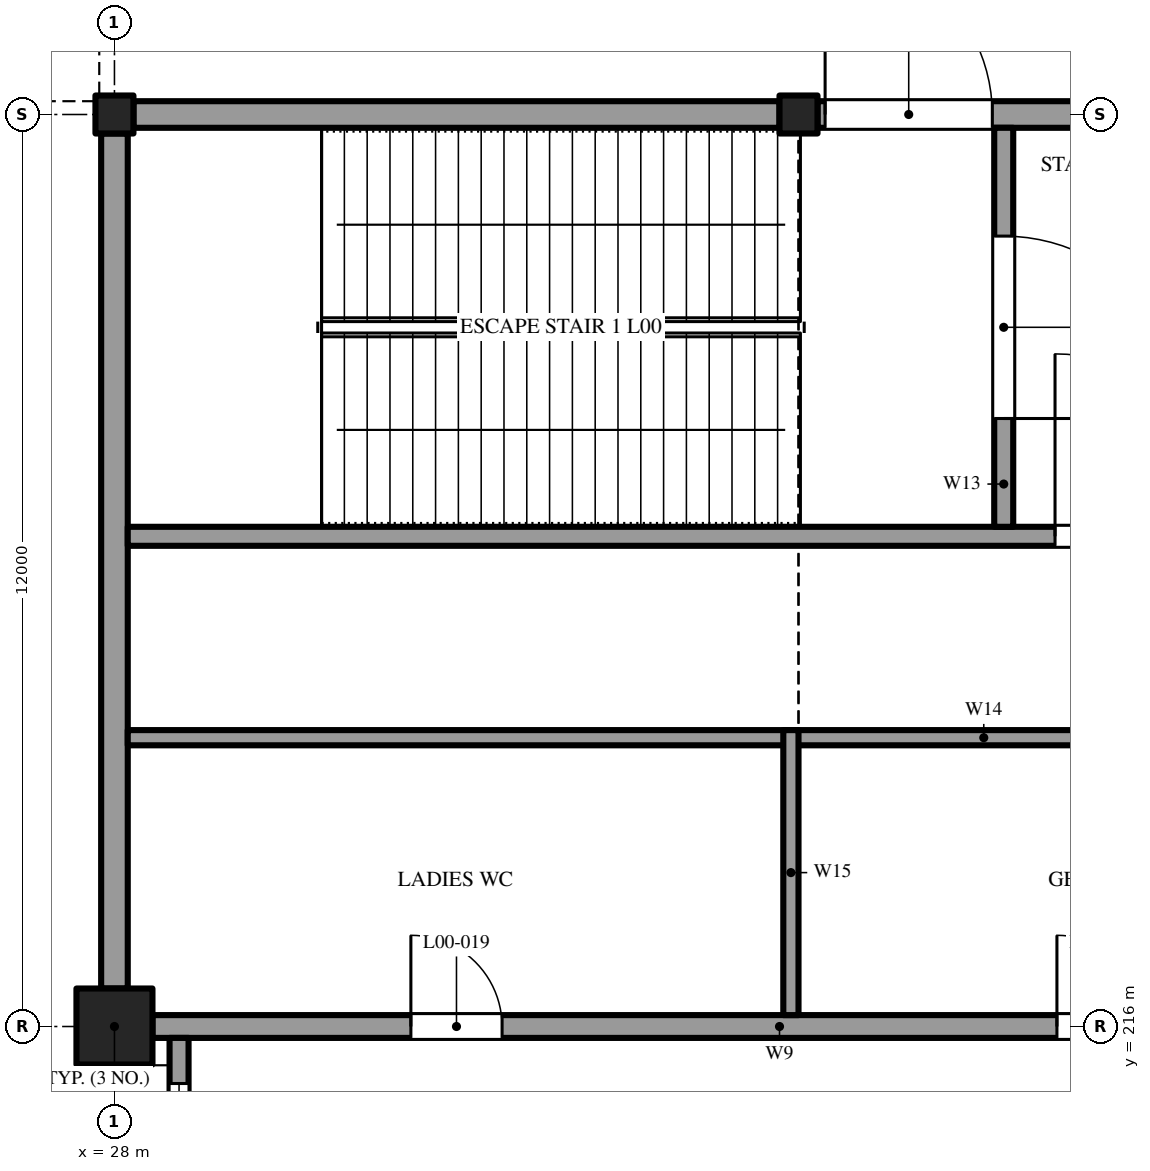
"""IFC4 building model, lengths in metres.
Left out: names, types, materials, properties, quantities, classifications, styles, units other than length and angle.
Written with IfcOpenShell. Run it as: python <this file> out.ifc"""

import sys

from ifc_helpers import new_model, si_unit, direction, frame, frame_2d, origin, origin_2d, place, context, subcontext, project, spatial, rectangle, extrude, element, fill, save


model = new_model("IFC4")
c1 = context("Model", 3, precision=1e-05, world=origin(), true_north=direction((0.0, 1.0)))
c2 = subcontext(c1, "Body", "Model", "MODEL_VIEW")
j1 = project(units=[si_unit("LENGTHUNIT", "METRE"), si_unit("PLANEANGLEUNIT", "RADIAN")], contexts=[c1])
p1 = place(None, origin())
s1 = spatial("IfcSite", under=j1, at=p1, CompositionType="ELEMENT")
p2 = place(p1, origin())
s2 = spatial("IfcBuilding", under=s1, at=p2, CompositionType="ELEMENT")
p3 = place(p2, origin())
s3 = spatial("IfcBuildingStorey", under=s2, at=p3, CompositionType="ELEMENT", Elevation=0.0)
p4 = place(p3, frame((28.0, 216.0, -0.4), z_axis=(0.0, 0.0, 1.0), x_axis=(1.0, 0.0, 0.0)))
e1 = element("IfcColumn", 1, at=p4, inside=s3, PredefinedType="COLUMN", context=c2, shape_type="SweptSolid", body=[
    extrude(rectangle(XDim=1.0, YDim=1.0, at=origin_2d()), origin(), (0.0, 0.0, 1.0), 7.6),
])
for number, where, z_axis, x_axis in (
    (2, (28.0, 228.0, -0.4), (0.0, 0.0, 1.0), (1.0, 0.0, 0.0)),
    (3, (37.0, 228.0, -0.4), (0.0, 0.0, 1.0), (1.0, 0.0, 0.0)),
):
    element("IfcColumn", number, at=place(p3, frame(where, z_axis=z_axis, x_axis=x_axis)), inside=s3, PredefinedType="COLUMN", context=c2, shape_type="SweptSolid", body=[
        extrude(rectangle(XDim=0.5, YDim=0.5, at=origin_2d()), origin(), (0.0, 0.0, 1.0), 7.6),
    ])
p5 = place(p3, frame((28.5, 216.0, 0.0), z_axis=(0.0, 0.0, 1.0), x_axis=(1.0, 0.0, 0.0)))
e4 = element("IfcWall", 4, at=p5, inside=s3, PredefinedType="SOLIDWALL", context=c2, shape_type="SweptSolid", body=[
    extrude(rectangle(XDim=17.0, YDim=0.3, at=frame_2d((8.5, 0.0))), origin(), (0.0, 0.0, 1.0), 6.8),
])
p6 = place(p5, frame((3.4, 0.0, 0.0)))
e5 = element("IfcOpeningElement", 5, at=p6, cuts=e4, PredefinedType="OPENING", context=c2, shape_type="SweptSolid", body=[
    extrude(rectangle(XDim=1.2, YDim=2.2, at=frame_2d((0.6, 1.1))), frame((0.0, 0.16, 0.0), z_axis=(0.0, -1.0, 0.0), x_axis=(1.0, 0.0, 0.0)), (0.0, 0.0, 1.0), 0.32),
])
p7 = place(p5, frame((11.9, 0.0, 0.0)))
e6 = element("IfcOpeningElement", 6, at=p7, cuts=e4, PredefinedType="OPENING", context=c2, shape_type="SweptSolid", body=[
    extrude(rectangle(XDim=1.2, YDim=2.2, at=frame_2d((0.6, 1.1))), frame((0.0, 0.16, 0.0), z_axis=(0.0, -1.0, 0.0), x_axis=(1.0, 0.0, 0.0)), (0.0, 0.0, 1.0), 0.32),
])
p8 = place(p3, frame((28.85, 132.15, 0.0), z_axis=(0.0, 0.0, 1.0), x_axis=(0.0, 1.0, 0.0)))
e7 = element("IfcWall", 7, at=p8, inside=s3, PredefinedType="SOLIDWALL", context=c2, shape_type="SweptSolid", body=[
    extrude(rectangle(XDim=83.7, YDim=0.25, at=frame_2d((41.85, 0.0))), origin(), (0.0, 0.0, 1.0), 7.2),
])
p9 = place(p8, frame((1.65, 0.0, 0.0)))
e8 = element("IfcOpeningElement", 8, at=p9, cuts=e7, PredefinedType="OPENING", context=c2, shape_type="SweptSolid", body=[
    extrude(rectangle(XDim=2.4, YDim=2.4, at=frame_2d((1.2, 1.2))), frame((0.0, 0.135, 0.0), z_axis=(0.0, -1.0, 0.0), x_axis=(1.0, 0.0, 0.0)), (0.0, 0.0, 1.0), 0.27),
])
p10 = place(p8, frame((0.6, 0.0, 3.2)))
e9 = element("IfcOpeningElement", 9, at=p10, cuts=e7, PredefinedType="OPENING", context=c2, shape_type="SweptSolid", body=[
    extrude(rectangle(XDim=4.5, YDim=3.0, at=frame_2d((2.25, 1.5))), frame((0.0, 0.135, 0.0), z_axis=(0.0, -1.0, 0.0), x_axis=(1.0, 0.0, 0.0)), (0.0, 0.0, 1.0), 0.27),
])
p11 = place(p8, frame((6.6, 0.0, 0.9)))
e10 = element("IfcOpeningElement", 10, at=p11, cuts=e7, PredefinedType="OPENING", context=c2, shape_type="SweptSolid", body=[
    extrude(rectangle(XDim=4.5, YDim=5.0, at=frame_2d((2.25, 2.5))), frame((0.0, 0.135, 0.0), z_axis=(0.0, -1.0, 0.0), x_axis=(1.0, 0.0, 0.0)), (0.0, 0.0, 1.0), 0.27),
])
p12 = place(p8, frame((13.65, 0.0, 0.0)))
e11 = element("IfcOpeningElement", 11, at=p12, cuts=e7, PredefinedType="OPENING", context=c2, shape_type="SweptSolid", body=[
    extrude(rectangle(XDim=2.4, YDim=2.4, at=frame_2d((1.2, 1.2))), frame((0.0, 0.135, 0.0), z_axis=(0.0, -1.0, 0.0), x_axis=(1.0, 0.0, 0.0)), (0.0, 0.0, 1.0), 0.27),
])
p13 = place(p8, frame((12.6, 0.0, 3.2)))
e12 = element("IfcOpeningElement", 12, at=p13, cuts=e7, PredefinedType="OPENING", context=c2, shape_type="SweptSolid", body=[
    extrude(rectangle(XDim=4.5, YDim=3.0, at=frame_2d((2.25, 1.5))), frame((0.0, 0.135, 0.0), z_axis=(0.0, -1.0, 0.0), x_axis=(1.0, 0.0, 0.0)), (0.0, 0.0, 1.0), 0.27),
])
p14 = place(p8, frame((18.6, 0.0, 0.9)))
e13 = element("IfcOpeningElement", 13, at=p14, cuts=e7, PredefinedType="OPENING", context=c2, shape_type="SweptSolid", body=[
    extrude(rectangle(XDim=4.5, YDim=5.0, at=frame_2d((2.25, 2.5))), frame((0.0, 0.135, 0.0), z_axis=(0.0, -1.0, 0.0), x_axis=(1.0, 0.0, 0.0)), (0.0, 0.0, 1.0), 0.27),
])
p15 = place(p8, frame((25.65, 0.0, 0.0)))
e14 = element("IfcOpeningElement", 14, at=p15, cuts=e7, PredefinedType="OPENING", context=c2, shape_type="SweptSolid", body=[
    extrude(rectangle(XDim=2.4, YDim=2.4, at=frame_2d((1.2, 1.2))), frame((0.0, 0.135, 0.0), z_axis=(0.0, -1.0, 0.0), x_axis=(1.0, 0.0, 0.0)), (0.0, 0.0, 1.0), 0.27),
])
p16 = place(p8, frame((24.6, 0.0, 3.2)))
e15 = element("IfcOpeningElement", 15, at=p16, cuts=e7, PredefinedType="OPENING", context=c2, shape_type="SweptSolid", body=[
    extrude(rectangle(XDim=4.5, YDim=3.0, at=frame_2d((2.25, 1.5))), frame((0.0, 0.135, 0.0), z_axis=(0.0, -1.0, 0.0), x_axis=(1.0, 0.0, 0.0)), (0.0, 0.0, 1.0), 0.27),
])
p17 = place(p8, frame((30.6, 0.0, 0.9)))
e16 = element("IfcOpeningElement", 16, at=p17, cuts=e7, PredefinedType="OPENING", context=c2, shape_type="SweptSolid", body=[
    extrude(rectangle(XDim=4.5, YDim=5.0, at=frame_2d((2.25, 2.5))), frame((0.0, 0.135, 0.0), z_axis=(0.0, -1.0, 0.0), x_axis=(1.0, 0.0, 0.0)), (0.0, 0.0, 1.0), 0.27),
])
p18 = place(p8, frame((37.65, 0.0, 0.0)))
e17 = element("IfcOpeningElement", 17, at=p18, cuts=e7, PredefinedType="OPENING", context=c2, shape_type="SweptSolid", body=[
    extrude(rectangle(XDim=2.4, YDim=2.4, at=frame_2d((1.2, 1.2))), frame((0.0, 0.135, 0.0), z_axis=(0.0, -1.0, 0.0), x_axis=(1.0, 0.0, 0.0)), (0.0, 0.0, 1.0), 0.27),
])
p19 = place(p8, frame((36.6, 0.0, 3.2)))
e18 = element("IfcOpeningElement", 18, at=p19, cuts=e7, PredefinedType="OPENING", context=c2, shape_type="SweptSolid", body=[
    extrude(rectangle(XDim=4.5, YDim=3.0, at=frame_2d((2.25, 1.5))), frame((0.0, 0.135, 0.0), z_axis=(0.0, -1.0, 0.0), x_axis=(1.0, 0.0, 0.0)), (0.0, 0.0, 1.0), 0.27),
])
p20 = place(p8, frame((43.65, 0.0, 0.0)))
e19 = element("IfcOpeningElement", 19, at=p20, cuts=e7, PredefinedType="OPENING", context=c2, shape_type="SweptSolid", body=[
    extrude(rectangle(XDim=2.4, YDim=2.4, at=frame_2d((1.2, 1.2))), frame((0.0, 0.135, 0.0), z_axis=(0.0, -1.0, 0.0), x_axis=(1.0, 0.0, 0.0)), (0.0, 0.0, 1.0), 0.27),
])
p21 = place(p8, frame((42.6, 0.0, 3.2)))
e20 = element("IfcOpeningElement", 20, at=p21, cuts=e7, PredefinedType="OPENING", context=c2, shape_type="SweptSolid", body=[
    extrude(rectangle(XDim=4.5, YDim=3.0, at=frame_2d((2.25, 1.5))), frame((0.0, 0.135, 0.0), z_axis=(0.0, -1.0, 0.0), x_axis=(1.0, 0.0, 0.0)), (0.0, 0.0, 1.0), 0.27),
])
p22 = place(p8, frame((48.6, 0.0, 0.9)))
e21 = element("IfcOpeningElement", 21, at=p22, cuts=e7, PredefinedType="OPENING", context=c2, shape_type="SweptSolid", body=[
    extrude(rectangle(XDim=4.5, YDim=5.0, at=frame_2d((2.25, 2.5))), frame((0.0, 0.135, 0.0), z_axis=(0.0, -1.0, 0.0), x_axis=(1.0, 0.0, 0.0)), (0.0, 0.0, 1.0), 0.27),
])
p23 = place(p8, frame((55.65, 0.0, 0.0)))
e22 = element("IfcOpeningElement", 22, at=p23, cuts=e7, PredefinedType="OPENING", context=c2, shape_type="SweptSolid", body=[
    extrude(rectangle(XDim=2.4, YDim=2.4, at=frame_2d((1.2, 1.2))), frame((0.0, 0.135, 0.0), z_axis=(0.0, -1.0, 0.0), x_axis=(1.0, 0.0, 0.0)), (0.0, 0.0, 1.0), 0.27),
])
p24 = place(p8, frame((54.6, 0.0, 3.2)))
e23 = element("IfcOpeningElement", 23, at=p24, cuts=e7, PredefinedType="OPENING", context=c2, shape_type="SweptSolid", body=[
    extrude(rectangle(XDim=4.5, YDim=3.0, at=frame_2d((2.25, 1.5))), frame((0.0, 0.135, 0.0), z_axis=(0.0, -1.0, 0.0), x_axis=(1.0, 0.0, 0.0)), (0.0, 0.0, 1.0), 0.27),
])
p25 = place(p8, frame((60.6, 0.0, 0.9)))
e24 = element("IfcOpeningElement", 24, at=p25, cuts=e7, PredefinedType="OPENING", context=c2, shape_type="SweptSolid", body=[
    extrude(rectangle(XDim=4.5, YDim=5.0, at=frame_2d((2.25, 2.5))), frame((0.0, 0.135, 0.0), z_axis=(0.0, -1.0, 0.0), x_axis=(1.0, 0.0, 0.0)), (0.0, 0.0, 1.0), 0.27),
])
p26 = place(p8, frame((67.65, 0.0, 0.0)))
e25 = element("IfcOpeningElement", 25, at=p26, cuts=e7, PredefinedType="OPENING", context=c2, shape_type="SweptSolid", body=[
    extrude(rectangle(XDim=2.4, YDim=2.4, at=frame_2d((1.2, 1.2))), frame((0.0, 0.135, 0.0), z_axis=(0.0, -1.0, 0.0), x_axis=(1.0, 0.0, 0.0)), (0.0, 0.0, 1.0), 0.27),
])
p27 = place(p8, frame((66.6, 0.0, 3.2)))
e26 = element("IfcOpeningElement", 26, at=p27, cuts=e7, PredefinedType="OPENING", context=c2, shape_type="SweptSolid", body=[
    extrude(rectangle(XDim=4.5, YDim=3.0, at=frame_2d((2.25, 1.5))), frame((0.0, 0.135, 0.0), z_axis=(0.0, -1.0, 0.0), x_axis=(1.0, 0.0, 0.0)), (0.0, 0.0, 1.0), 0.27),
])
p28 = place(p8, frame((72.6, 0.0, 0.9)))
e27 = element("IfcOpeningElement", 27, at=p28, cuts=e7, PredefinedType="OPENING", context=c2, shape_type="SweptSolid", body=[
    extrude(rectangle(XDim=4.5, YDim=5.0, at=frame_2d((2.25, 2.5))), frame((0.0, 0.135, 0.0), z_axis=(0.0, -1.0, 0.0), x_axis=(1.0, 0.0, 0.0)), (0.0, 0.0, 1.0), 0.27),
])
p29 = place(p8, frame((79.65, 0.0, 0.0)))
e28 = element("IfcOpeningElement", 28, at=p29, cuts=e7, PredefinedType="OPENING", context=c2, shape_type="SweptSolid", body=[
    extrude(rectangle(XDim=2.4, YDim=2.4, at=frame_2d((1.2, 1.2))), frame((0.0, 0.135, 0.0), z_axis=(0.0, -1.0, 0.0), x_axis=(1.0, 0.0, 0.0)), (0.0, 0.0, 1.0), 0.27),
])
p30 = place(p8, frame((78.6, 0.0, 3.2)))
e29 = element("IfcOpeningElement", 29, at=p30, cuts=e7, PredefinedType="OPENING", context=c2, shape_type="SweptSolid", body=[
    extrude(rectangle(XDim=4.5, YDim=3.0, at=frame_2d((2.25, 1.5))), frame((0.0, 0.135, 0.0), z_axis=(0.0, -1.0, 0.0), x_axis=(1.0, 0.0, 0.0)), (0.0, 0.0, 1.0), 0.27),
])
p31 = place(p3, frame((28.0, 216.5, 0.0), z_axis=(0.0, 0.0, 1.0), x_axis=(0.0, 1.0, 0.0)))
e30 = element("IfcWall", 30, at=p31, inside=s3, PredefinedType="SOLIDWALL", context=c2, shape_type="SweptSolid", body=[
    extrude(rectangle(XDim=11.25, YDim=0.35, at=frame_2d((5.625, 0.0))), origin(), (0.0, 0.0, 1.0), 6.8),
])
p32 = place(p3, frame((28.25, 228.0, 0.0), z_axis=(0.0, 0.0, 1.0), x_axis=(1.0, 0.0, 0.0)))
e31 = element("IfcWall", 31, at=p32, inside=s3, PredefinedType="SOLIDWALL", context=c2, shape_type="SweptSolid", body=[
    extrude(rectangle(XDim=8.5, YDim=0.35, at=frame_2d((4.25, 0.0))), origin(), (0.0, 0.0, 1.0), 6.8),
])
p33 = place(p3, frame((37.25, 228.0, 0.0), z_axis=(0.0, 0.0, 1.0), x_axis=(1.0, 0.0, 0.0)))
e32 = element("IfcWall", 32, at=p33, inside=s3, PredefinedType="SOLIDWALL", context=c2, shape_type="SweptSolid", body=[
    extrude(rectangle(XDim=8.5, YDim=0.35, at=frame_2d((4.25, 0.0))), origin(), (0.0, 0.0, 1.0), 6.8),
])
p34 = place(p33, frame((0.1, 0.0, 0.0)))
e33 = element("IfcOpeningElement", 33, at=p34, cuts=e32, PredefinedType="OPENING", context=c2, shape_type="SweptSolid", body=[
    extrude(rectangle(XDim=2.2, YDim=2.2, at=frame_2d((1.1, 1.1))), frame((0.0, 0.185, 0.0), z_axis=(0.0, -1.0, 0.0), x_axis=(1.0, 0.0, 0.0)), (0.0, 0.0, 1.0), 0.37),
])
p35 = place(p3, frame((28.175, 222.45, 0.0), z_axis=(0.0, 0.0, 1.0), x_axis=(1.0, 0.0, 0.0)))
e34 = element("IfcWall", 34, at=p35, inside=s3, PredefinedType="SOLIDWALL", context=c2, shape_type="SweptSolid", body=[
    extrude(rectangle(XDim=15.4, YDim=0.25, at=frame_2d((7.7, 0.0))), origin(), (0.0, 0.0, 1.0), 6.8),
])
p36 = place(p35, frame((12.2, 0.0, 0.0)))
e35 = element("IfcOpeningElement", 35, at=p36, cuts=e34, PredefinedType="OPENING", context=c2, shape_type="SweptSolid", body=[
    extrude(rectangle(XDim=2.4, YDim=2.2, at=frame_2d((1.2, 1.1))), frame((0.0, 0.135, 0.0), z_axis=(0.0, -1.0, 0.0), x_axis=(1.0, 0.0, 0.0)), (0.0, 0.0, 1.0), 0.27),
])
p37 = place(p3, frame((39.7, 222.575, 0.0), z_axis=(0.0, 0.0, 1.0), x_axis=(0.0, 1.0, 0.0)))
e36 = element("IfcWall", 36, at=p37, inside=s3, PredefinedType="SOLIDWALL", context=c2, shape_type="SweptSolid", body=[
    extrude(rectangle(XDim=5.25, YDim=0.25, at=frame_2d((2.625, 0.0))), origin(), (0.0, 0.0, 1.0), 6.8),
])
p38 = place(p37, frame((1.425, 0.0, 0.0)))
e37 = element("IfcOpeningElement", 37, at=p38, cuts=e36, PredefinedType="OPENING", context=c2, shape_type="SweptSolid", body=[
    extrude(rectangle(XDim=2.4, YDim=2.2, at=frame_2d((1.2, 1.1))), frame((0.0, 0.135, 0.0), z_axis=(0.0, -1.0, 0.0), x_axis=(1.0, 0.0, 0.0)), (0.0, 0.0, 1.0), 0.27),
])
p39 = place(p3, frame((28.175, 219.8, 0.0), z_axis=(0.0, 0.0, 1.0), x_axis=(1.0, 0.0, 0.0)))
e38 = element("IfcWall", 38, at=p39, inside=s3, PredefinedType="SOLIDWALL", context=c2, shape_type="SweptSolid", body=[
    extrude(rectangle(XDim=37.125, YDim=0.2, at=frame_2d((18.562, 0.0))), origin(), (0.0, 0.0, 1.0), 6.8),
])
p40 = place(p39, frame((22.825, 0.0, 0.0)))
e39 = element("IfcOpeningElement", 39, at=p40, cuts=e38, PredefinedType="OPENING", context=c2, shape_type="SweptSolid", body=[
    extrude(rectangle(XDim=1.0, YDim=2.1, at=frame_2d((0.5, 1.05))), frame((0.0, 0.11, 0.0), z_axis=(0.0, -1.0, 0.0), x_axis=(1.0, 0.0, 0.0)), (0.0, 0.0, 1.0), 0.22),
])
p41 = place(p39, frame((27.425, 0.0, 0.0)))
e40 = element("IfcOpeningElement", 40, at=p41, cuts=e38, PredefinedType="OPENING", context=c2, shape_type="SweptSolid", body=[
    extrude(rectangle(XDim=1.2, YDim=2.1, at=frame_2d((0.6, 1.05))), frame((0.0, 0.11, 0.0), z_axis=(0.0, -1.0, 0.0), x_axis=(1.0, 0.0, 0.0)), (0.0, 0.0, 1.0), 0.22),
])
p42 = place(p39, frame((33.425, 0.0, 0.0)))
e41 = element("IfcOpeningElement", 41, at=p42, cuts=e38, PredefinedType="OPENING", context=c2, shape_type="SweptSolid", body=[
    extrude(rectangle(XDim=1.2, YDim=2.1, at=frame_2d((0.6, 1.05))), frame((0.0, 0.11, 0.0), z_axis=(0.0, -1.0, 0.0), x_axis=(1.0, 0.0, 0.0)), (0.0, 0.0, 1.0), 0.22),
])
p43 = place(p3, frame((36.9, 216.15, 0.0), z_axis=(0.0, 0.0, 1.0), x_axis=(0.0, 1.0, 0.0)))
e42 = element("IfcWall", 42, at=p43, inside=s3, PredefinedType="PARTITIONING", context=c2, shape_type="SweptSolid", body=[
    extrude(rectangle(XDim=3.75, YDim=0.2, at=frame_2d((1.875, 0.0))), origin(), (0.0, 0.0, 1.0), 6.8),
])
p44 = place(p6, origin())
e43 = element("IfcDoor", 43, at=p44, inside=s3, OperationType="SINGLE_SWING_LEFT", PredefinedType="DOOR", context=c2, shape_type="SweptSolid", body=[
    extrude(rectangle(XDim=1.2, YDim=2.2, at=frame_2d((0.6, 1.1))), frame((0.0, 0.025, 0.0), z_axis=(0.0, -1.0, 0.0), x_axis=(1.0, 0.0, 0.0)), (0.0, 0.0, 1.0), 0.05),
])
fill(e5, e43)
p45 = place(p7, origin())
e44 = element("IfcDoor", 44, at=p45, inside=s3, OperationType="SINGLE_SWING_RIGHT", PredefinedType="DOOR", context=c2, shape_type="SweptSolid", body=[
    extrude(rectangle(XDim=1.2, YDim=2.2, at=frame_2d((0.6, 1.1))), frame((0.0, 0.025, 0.0), z_axis=(0.0, -1.0, 0.0), x_axis=(1.0, 0.0, 0.0)), (0.0, 0.0, 1.0), 0.05),
])
fill(e6, e44)
p46 = place(p30, origin())
e45 = element("IfcWindow", 45, at=p46, inside=s3, PartitioningType="SINGLE_PANEL", PredefinedType="WINDOW", context=c2, shape_type="SweptSolid", body=[
    extrude(rectangle(XDim=4.5, YDim=3.0, at=frame_2d((2.25, 1.5))), frame((0.0, 0.03, 0.0), z_axis=(0.0, -1.0, 0.0), x_axis=(1.0, 0.0, 0.0)), (0.0, 0.0, 1.0), 0.06),
])
fill(e29, e45)
p47 = place(p34, origin())
e46 = element("IfcDoor", 46, at=p47, inside=s3, OperationType="DOUBLE_DOOR_SINGLE_SWING", PredefinedType="DOOR", context=c2, shape_type="SweptSolid", body=[
    extrude(rectangle(XDim=2.2, YDim=2.2, at=frame_2d((1.1, 1.1))), frame((0.0, 0.025, 0.0), z_axis=(0.0, -1.0, 0.0), x_axis=(1.0, 0.0, 0.0)), (0.0, 0.0, 1.0), 0.05),
])
fill(e33, e46)
p48 = place(p36, origin())
e47 = element("IfcDoor", 47, at=p48, inside=s3, OperationType="DOUBLE_DOOR_SINGLE_SWING", PredefinedType="DOOR", context=c2, shape_type="SweptSolid", body=[
    extrude(rectangle(XDim=2.4, YDim=2.2, at=frame_2d((1.2, 1.1))), frame((0.0, 0.025, 0.0), z_axis=(0.0, -1.0, 0.0), x_axis=(1.0, 0.0, 0.0)), (0.0, 0.0, 1.0), 0.05),
])
fill(e35, e47)
p49 = place(p38, frame((2.4, 0.0, 0.0), z_axis=(0.0, 0.0, 1.0), x_axis=(-1.0, 0.0, 0.0)))
e48 = element("IfcDoor", 48, at=p49, inside=s3, OperationType="DOUBLE_DOOR_SINGLE_SWING", PredefinedType="DOOR", context=c2, shape_type="SweptSolid", body=[
    extrude(rectangle(XDim=2.4, YDim=2.2, at=frame_2d((1.2, 1.1))), frame((0.0, 0.025, 0.0), z_axis=(0.0, -1.0, 0.0), x_axis=(1.0, 0.0, 0.0)), (0.0, 0.0, 1.0), 0.05),
])
fill(e37, e48)
save(model, sys.argv[1])
